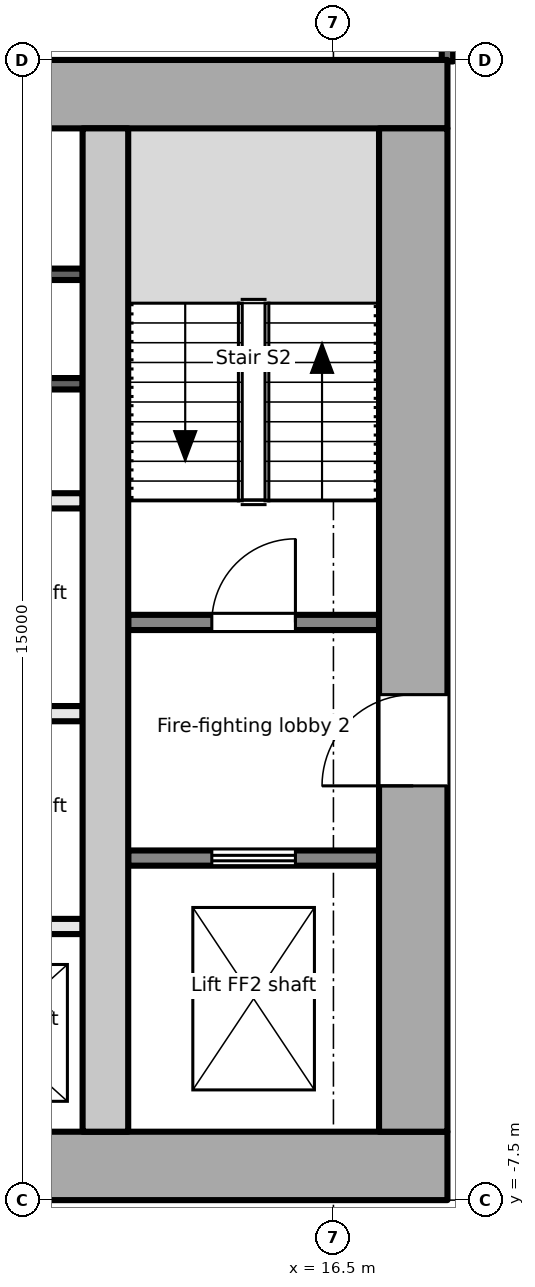
"""IFC4 building model, lengths in metres.
Left out: names, types, materials, properties, quantities, classifications, styles, units other than length and angle.
Written with IfcOpenShell. Run it as: python <this file> out.ifc"""

import sys

from ifc_helpers import new_model, si_unit, direction, frame, frame_2d, origin, place, context, subcontext, project, spatial, rectangle, extrude, element, fill, save


model = new_model("IFC4")
c1 = context("Model", 3, precision=1e-05, world=origin(), true_north=direction((0.0, 1.0)))
c2 = subcontext(c1, "Body", "Model", "MODEL_VIEW")
j1 = project(units=[si_unit("LENGTHUNIT", "METRE"), si_unit("PLANEANGLEUNIT", "RADIAN")], contexts=[c1])
p1 = place(None, origin())
s1 = spatial("IfcSite", under=j1, at=p1, CompositionType="ELEMENT")
p2 = place(p1, origin())
s2 = spatial("IfcBuilding", under=s1, at=p2, CompositionType="ELEMENT")
p3 = place(p2, frame((0.0, 0.0, 65.2)))
s3 = spatial("IfcBuildingStorey", under=s2, at=p3, CompositionType="ELEMENT", Elevation=65.2)
p4 = place(p3, frame((-18.0, -7.05, -0.2), z_axis=(0.0, 0.0, 1.0), x_axis=(1.0, 0.0, 0.0)))
e1 = element("IfcWall", 1, at=p4, inside=s3, PredefinedType="SHEAR", context=c2, shape_type="SweptSolid", body=[
    extrude(rectangle(XDim=36.0, YDim=0.9, at=frame_2d((18.0, 0.0))), origin(), (0.0, 0.0, 1.0), 4.1),
])
p5 = place(p4, frame((7.8, 0.0, 0.2)))
e2 = element("IfcOpeningElement", 2, at=p5, cuts=e1, PredefinedType="OPENING", context=c2, shape_type="SweptSolid", body=[
    extrude(rectangle(XDim=2.4, YDim=2.1, at=frame_2d((1.2, 1.05))), frame((0.0, 0.46, 0.0), z_axis=(0.0, -1.0, 0.0), x_axis=(1.0, 0.0, 0.0)), (0.0, 0.0, 1.0), 0.921),
])
p6 = place(p4, frame((17.4, 0.0, 0.2)))
e3 = element("IfcOpeningElement", 3, at=p6, cuts=e1, PredefinedType="OPENING", context=c2, shape_type="SweptSolid", body=[
    extrude(rectangle(XDim=1.2, YDim=2.1, at=frame_2d((0.6, 1.05))), frame((0.0, 0.46, 0.0), z_axis=(0.0, -1.0, 0.0), x_axis=(1.0, 0.0, 0.0)), (0.0, 0.0, 1.0), 0.921),
])
p7 = place(p4, frame((26.1, 0.0, 0.2)))
e4 = element("IfcOpeningElement", 4, at=p7, cuts=e1, PredefinedType="OPENING", context=c2, shape_type="SweptSolid", body=[
    extrude(rectangle(XDim=2.4, YDim=2.1, at=frame_2d((1.2, 1.05))), frame((0.0, 0.46, 0.0), z_axis=(0.0, -1.0, 0.0), x_axis=(1.0, 0.0, 0.0)), (0.0, 0.0, 1.0), 0.921),
])
p8 = place(p3, frame((-18.0, 7.05, -0.2), z_axis=(0.0, 0.0, 1.0), x_axis=(1.0, 0.0, 0.0)))
e5 = element("IfcWall", 5, at=p8, inside=s3, PredefinedType="SHEAR", context=c2, shape_type="SweptSolid", body=[
    extrude(rectangle(XDim=36.0, YDim=0.9, at=frame_2d((18.0, 0.0))), origin(), (0.0, 0.0, 1.0), 4.1),
])
p9 = place(p3, frame((17.55, -6.6, -0.2), z_axis=(0.0, 0.0, 1.0), x_axis=(0.0, 1.0, 0.0)))
e6 = element("IfcWall", 6, at=p9, inside=s3, PredefinedType="SHEAR", context=c2, shape_type="SweptSolid", body=[
    extrude(rectangle(XDim=13.2, YDim=0.9, at=frame_2d((6.6, 0.0))), origin(), (0.0, 0.0, 1.0), 4.1),
])
p10 = place(p9, frame((4.55, 0.0, 0.2)))
e7 = element("IfcOpeningElement", 7, at=p10, cuts=e6, PredefinedType="OPENING", context=c2, shape_type="SweptSolid", body=[
    extrude(rectangle(XDim=1.2, YDim=2.1, at=frame_2d((0.6, 1.05))), frame((0.0, 0.46, 0.0), z_axis=(0.0, -1.0, 0.0), x_axis=(1.0, 0.0, 0.0)), (0.0, 0.0, 1.0), 0.921),
])
p11 = place(p3, frame((13.5, -6.6, -0.2), z_axis=(0.0, 0.0, 1.0), x_axis=(0.0, 1.0, 0.0)))
e8 = element("IfcWall", 8, at=p11, inside=s3, PredefinedType="SHEAR", context=c2, shape_type="SweptSolid", body=[
    extrude(rectangle(XDim=13.2, YDim=0.6, at=frame_2d((6.6, 0.0))), origin(), (0.0, 0.0, 1.0), 4.1),
])
p12 = place(p3, frame((13.8, -3.0, 0.0), z_axis=(0.0, 0.0, 1.0), x_axis=(1.0, 0.0, 0.0)))
e9 = element("IfcWall", 9, at=p12, inside=s3, PredefinedType="PARTITIONING", context=c2, shape_type="SweptSolid", body=[
    extrude(rectangle(XDim=3.3, YDim=0.2, at=frame_2d((1.65, 0.0))), origin(), (0.0, 0.0, 1.0), 3.9),
])
p13 = place(p12, frame((1.1, 0.0, 0.0)))
e10 = element("IfcOpeningElement", 10, at=p13, cuts=e9, PredefinedType="OPENING", context=c2, shape_type="SweptSolid", body=[
    extrude(rectangle(XDim=1.1, YDim=2.1, at=frame_2d((0.55, 1.05))), frame((0.0, 0.111, 0.0), z_axis=(0.0, -1.0, 0.0), x_axis=(1.0, 0.0, 0.0)), (0.0, 0.0, 1.0), 0.221),
])
p14 = place(p3, frame((13.8, 0.1, 0.0), z_axis=(0.0, 0.0, 1.0), x_axis=(1.0, 0.0, 0.0)))
e11 = element("IfcWall", 11, at=p14, inside=s3, PredefinedType="PARTITIONING", context=c2, shape_type="SweptSolid", body=[
    extrude(rectangle(XDim=3.3, YDim=0.2, at=frame_2d((1.65, 0.0))), origin(), (0.0, 0.0, 1.0), 3.9),
])
p15 = place(p14, frame((1.1, 0.0, 0.0)))
e12 = element("IfcOpeningElement", 12, at=p15, cuts=e11, PredefinedType="OPENING", context=c2, shape_type="SweptSolid", body=[
    extrude(rectangle(XDim=1.1, YDim=2.1, at=frame_2d((0.55, 1.05))), frame((0.0, 0.111, 0.0), z_axis=(0.0, -1.0, 0.0), x_axis=(1.0, 0.0, 0.0)), (0.0, 0.0, 1.0), 0.221),
])
for number, where, z_axis, x_axis in (
    (13, (10.9, -3.9, 0.0), (0.0, 0.0, 1.0), (1.0, 0.0, 0.0)),
    (14, (10.9, -1.1, 0.0), (0.0, 0.0, 1.0), (1.0, 0.0, 0.0)),
    (15, (10.9, 1.7, 0.0), (0.0, 0.0, 1.0), (1.0, 0.0, 0.0)),
):
    element("IfcWall", number, at=place(p3, frame(where, z_axis=z_axis, x_axis=x_axis)), inside=s3, PredefinedType="PARTITIONING", context=c2, shape_type="SweptSolid", body=[
        extrude(rectangle(XDim=2.3, YDim=0.2, at=frame_2d((1.15, 0.0))), origin(), (0.0, 0.0, 1.0), 3.9),
    ])
for number, where, z_axis, x_axis in (
    (16, (10.9, 3.24, 0.0), (0.0, 0.0, 1.0), (1.0, 0.0, 0.0)),
    (17, (10.9, 4.68, 0.0), (0.0, 0.0, 1.0), (1.0, 0.0, 0.0)),
):
    element("IfcWall", number, at=place(p3, frame(where, z_axis=z_axis, x_axis=x_axis)), inside=s3, PredefinedType="PARTITIONING", context=c2, shape_type="SweptSolid", body=[
        extrude(rectangle(XDim=2.3, YDim=0.15, at=frame_2d((1.15, 0.0))), origin(), (0.0, 0.0, 1.0), 3.9),
    ])
p16 = place(p3, frame((18.0, 7.48, 0.0), z_axis=(0.0, 0.0, 1.0), x_axis=(0.0, 1.0, 0.0)))
e18 = element("IfcWall", 18, at=p16, inside=s3, PredefinedType="PARTITIONING", context=c2, shape_type="SweptSolid", body=[
    extrude(rectangle(XDim=2.26, YDim=0.15, at=frame_2d((1.13, 0.0))), origin(), (0.0, 0.0, 1.0), 2.9),
])
p17 = place(p13, origin())
e19 = element("IfcDoor", 19, at=p17, inside=s3, OperationType="DOUBLE_DOOR_SLIDING", PredefinedType="DOOR", context=c2, shape_type="SweptSolid", body=[
    extrude(rectangle(XDim=1.1, YDim=2.1, at=frame_2d((0.55, 1.05))), frame((0.0, 0.025, 0.0), z_axis=(0.0, -1.0, 0.0), x_axis=(1.0, 0.0, 0.0)), (0.0, 0.0, 1.0), 0.05),
])
fill(e10, e19)
p18 = place(p10, origin())
e20 = element("IfcDoor", 20, at=p18, inside=s3, OperationType="SINGLE_SWING_LEFT", PredefinedType="DOOR", context=c2, shape_type="SweptSolid", body=[
    extrude(rectangle(XDim=1.2, YDim=2.1, at=frame_2d((0.6, 1.05))), frame((0.0, 0.025, 0.0), z_axis=(0.0, -1.0, 0.0), x_axis=(1.0, 0.0, 0.0)), (0.0, 0.0, 1.0), 0.05),
])
fill(e7, e20)
p19 = place(p15, origin())
e21 = element("IfcDoor", 21, at=p19, inside=s3, OperationType="SINGLE_SWING_RIGHT", PredefinedType="DOOR", context=c2, shape_type="SweptSolid", body=[
    extrude(rectangle(XDim=1.1, YDim=2.1, at=frame_2d((0.55, 1.05))), frame((0.0, 0.025, 0.0), z_axis=(0.0, -1.0, 0.0), x_axis=(1.0, 0.0, 0.0)), (0.0, 0.0, 1.0), 0.05),
])
fill(e12, e21)
save(model, sys.argv[1])
